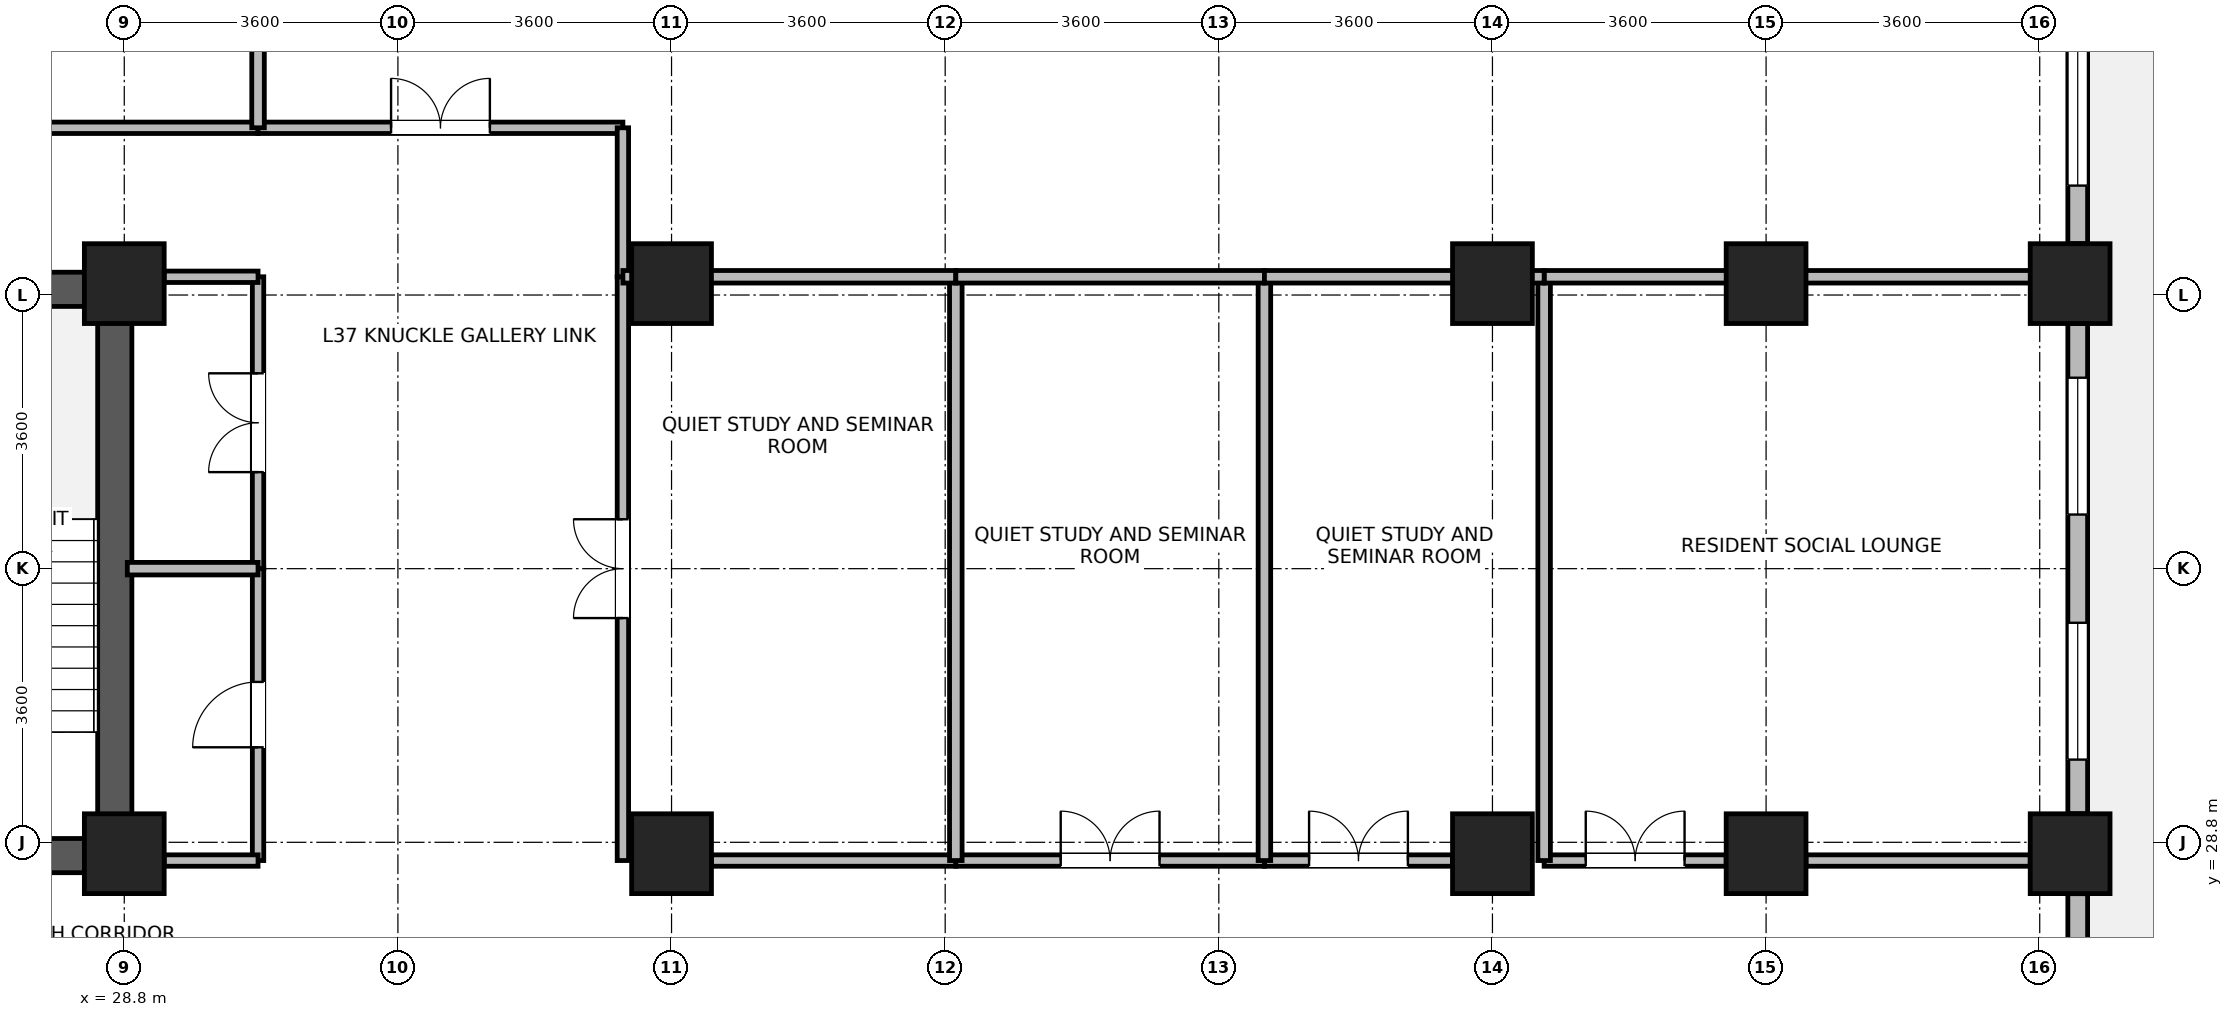
"""IFC4 building model, lengths in metres.
Left out: names, types, materials, properties, quantities, classifications, styles, units other than length and angle.
Written with IfcOpenShell. Run it as: python <this file> out.ifc"""

import sys

from ifc_helpers import new_model, si_unit, direction, frame, frame_2d, origin, origin_2d, place, context, subcontext, project, spatial, rectangle, extrude, source, transform, mapped, element, fill, save


model = new_model("IFC4")
c1 = context("Model", 3, precision=1e-05, world=origin(), true_north=direction((0.0, 1.0)))
c2 = subcontext(c1, "Body", "Model", "MODEL_VIEW")
j1 = project(units=[si_unit("LENGTHUNIT", "METRE"), si_unit("PLANEANGLEUNIT", "RADIAN")], contexts=[c1])
p1 = place(None, origin())
s1 = spatial("IfcSite", under=j1, at=p1, CompositionType="ELEMENT")
p2 = place(p1, origin())
s2 = spatial("IfcBuilding", under=s1, at=p2, CompositionType="ELEMENT")
p3 = place(p2, frame((0.0, 0.0, 147.6)))
s3 = spatial("IfcBuildingStorey", under=s2, at=p3, CompositionType="ELEMENT", Elevation=147.6)
p4 = place(p3, frame((28.675, 28.4, 0.0), z_axis=(0.0, 0.0, 1.0), x_axis=(0.0, 1.0, 0.0)))
e1 = element("IfcWall", 1, at=p4, inside=s3, PredefinedType="SHEAR", context=c2, shape_type="SweptSolid", body=[
    extrude(rectangle(XDim=7.9, YDim=0.45, at=frame_2d((3.95, 0.0))), origin(), (0.0, 0.0, 1.0), 3.46),
])
for number, where, z_axis, x_axis in (
    (2, (25.25, 28.625, 0.0), (0.0, 0.0, 1.0), (1.0, 0.0, 0.0)),
    (3, (25.25, 36.075, 0.0), (0.0, 0.0, 1.0), (1.0, 0.0, 0.0)),
):
    element("IfcWall", number, at=place(p3, frame(where, z_axis=z_axis, x_axis=x_axis)), inside=s3, PredefinedType="SHEAR", context=c2, shape_type="SweptSolid", body=[
        extrude(rectangle(XDim=3.2, YDim=0.45, at=frame_2d((1.6, 0.0))), origin(), (0.0, 0.0, 1.0), 3.46),
    ])
m1 = source(origin(), c2, "Body", "SweptSolid", [
    extrude(rectangle(XDim=1.05, YDim=1.05, at=origin_2d()), origin(), (0.0, 0.0, 1.0), 3.7),
])
for number, where, z_axis, x_axis in (
    (4, (28.8, 28.65, 0.0), (0.0, 0.0, 1.0), (1.0, 0.0, 0.0)),
    (5, (28.8, 36.15, 0.0), (0.0, 0.0, 1.0), (1.0, 0.0, 0.0)),
    (6, (36.0, 28.65, 0.0), (0.0, 0.0, 1.0), (1.0, 0.0, 0.0)),
    (7, (36.0, 36.15, 0.0), (0.0, 0.0, 1.0), (1.0, 0.0, 0.0)),
    (8, (46.8, 28.65, 0.0), (0.0, 0.0, 1.0), (1.0, 0.0, 0.0)),
    (9, (46.8, 36.15, 0.0), (0.0, 0.0, 1.0), (1.0, 0.0, 0.0)),
    (10, (50.4, 28.65, 0.0), (0.0, 0.0, 1.0), (1.0, 0.0, 0.0)),
    (11, (50.4, 36.15, 0.0), (0.0, 0.0, 1.0), (1.0, 0.0, 0.0)),
    (12, (54.4, 28.65, 0.0), (0.0, 0.0, 1.0), (1.0, 0.0, 0.0)),
    (13, (54.4, 36.15, 0.0), (0.0, 0.0, 1.0), (1.0, 0.0, 0.0)),
):
    element("IfcColumn", number, at=place(p3, frame(where, z_axis=z_axis, x_axis=x_axis)), inside=s3, PredefinedType="COLUMN", context=c2, shape_type="MappedRepresentation", body=[
        mapped(m1, transform((0.0, 0.0, 0.0), x_axis=(1.0, 0.0, 0.0), y_axis=(0.0, 1.0, 0.0), z_axis=(0.0, 0.0, 1.0), scale=1.0)),
    ])
p5 = place(p3, frame((54.5, 28.124, 0.0), z_axis=(0.0, 0.0, 1.0), x_axis=(0.0, -1.0, 0.0)))
e14 = element("IfcWall", 14, at=p5, inside=s3, PredefinedType="STANDARD", context=c2, shape_type="SweptSolid", body=[
    extrude(rectangle(XDim=5.998, YDim=0.26, at=frame_2d((2.999, 0.0))), origin(), (0.0, 0.0, 1.0), 2.99),
])
p6 = place(p5, frame((3.598, 0.0, 0.85)))
e15 = element("IfcOpeningElement", 15, at=p6, cuts=e14, PredefinedType="OPENING", context=c2, shape_type="SweptSolid", body=[
    extrude(rectangle(XDim=1.8, YDim=1.85, at=frame_2d((0.9, 0.925))), frame((0.0, 0.14, 0.0), z_axis=(0.0, -1.0, 0.0), x_axis=(1.0, 0.0, 0.0)), (0.0, 0.0, 1.0), 0.28),
])
p7 = place(p5, frame((2.044, 0.0, 0.85)))
e16 = element("IfcOpeningElement", 16, at=p7, cuts=e14, PredefinedType="OPENING", context=c2, shape_type="SweptSolid", body=[
    extrude(rectangle(XDim=0.95, YDim=1.75, at=frame_2d((0.475, 0.875))), frame((0.0, 0.14, 0.0), z_axis=(0.0, -1.0, 0.0), x_axis=(1.0, 0.0, 0.0)), (0.0, 0.0, 1.0), 0.28),
])
p8 = place(p3, frame((54.5, 35.624, 0.0), z_axis=(0.0, 0.0, 1.0), x_axis=(0.0, -1.0, 0.0)))
e17 = element("IfcWall", 17, at=p8, inside=s3, PredefinedType="STANDARD", context=c2, shape_type="SweptSolid", body=[
    extrude(rectangle(XDim=6.448, YDim=0.26, at=frame_2d((3.224, 0.0))), origin(), (0.0, 0.0, 1.0), 2.99),
])
p9 = place(p8, frame((0.712, 0.0, 0.85)))
e18 = element("IfcOpeningElement", 18, at=p9, cuts=e17, PredefinedType="OPENING", context=c2, shape_type="SweptSolid", body=[
    extrude(rectangle(XDim=1.8, YDim=1.85, at=frame_2d((0.9, 0.925))), frame((0.0, 0.14, 0.0), z_axis=(0.0, -1.0, 0.0), x_axis=(1.0, 0.0, 0.0)), (0.0, 0.0, 1.0), 0.28),
])
p10 = place(p8, frame((3.936, 0.0, 0.85)))
e19 = element("IfcOpeningElement", 19, at=p10, cuts=e17, PredefinedType="OPENING", context=c2, shape_type="SweptSolid", body=[
    extrude(rectangle(XDim=1.8, YDim=1.85, at=frame_2d((0.9, 0.925))), frame((0.0, 0.14, 0.0), z_axis=(0.0, -1.0, 0.0), x_axis=(1.0, 0.0, 0.0)), (0.0, 0.0, 1.0), 0.28),
])
p11 = place(p3, frame((54.5, 43.33, 0.0), z_axis=(0.0, 0.0, 1.0), x_axis=(0.0, -1.0, 0.0)))
e20 = element("IfcWall", 20, at=p11, inside=s3, PredefinedType="STANDARD", context=c2, shape_type="SweptSolid", body=[
    extrude(rectangle(XDim=6.654, YDim=0.26, at=frame_2d((3.327, 0.0))), origin(), (0.0, 0.0, 1.0), 3.44),
])
p12 = place(p11, frame((0.763, 0.0, 0.85)))
e21 = element("IfcOpeningElement", 21, at=p12, cuts=e20, PredefinedType="OPENING", context=c2, shape_type="SweptSolid", body=[
    extrude(rectangle(XDim=1.8, YDim=1.85, at=frame_2d((0.9, 0.925))), frame((0.0, 0.14, 0.0), z_axis=(0.0, -1.0, 0.0), x_axis=(1.0, 0.0, 0.0)), (0.0, 0.0, 1.0), 0.28),
])
p13 = place(p11, frame((4.091, 0.0, 0.85)))
e22 = element("IfcOpeningElement", 22, at=p13, cuts=e20, PredefinedType="OPENING", context=c2, shape_type="SweptSolid", body=[
    extrude(rectangle(XDim=1.8, YDim=1.85, at=frame_2d((0.9, 0.925))), frame((0.0, 0.14, 0.0), z_axis=(0.0, -1.0, 0.0), x_axis=(1.0, 0.0, 0.0)), (0.0, 0.0, 1.0), 0.28),
])
p14 = place(p3, frame((35.36, 28.56, 0.0), z_axis=(0.0, 0.0, 1.0), x_axis=(0.0, 1.0, 0.0)))
e23 = element("IfcWall", 23, at=p14, inside=s3, PredefinedType="PARTITIONING", context=c2, shape_type="SweptSolid", body=[
    extrude(rectangle(XDim=7.68, YDim=0.15, at=frame_2d((3.84, 0.0))), origin(), (0.0, 0.0, 1.0), 3.44),
])
p15 = place(p14, frame((3.19, 0.0, 0.0)))
e24 = element("IfcOpeningElement", 24, at=p15, cuts=e23, PredefinedType="OPENING", context=c2, shape_type="SweptSolid", body=[
    extrude(rectangle(XDim=1.3, YDim=2.12, at=frame_2d((0.65, 1.06))), frame((0.0, 0.085, 0.0), z_axis=(0.0, -1.0, 0.0), x_axis=(1.0, 0.0, 0.0)), (0.0, 0.0, 1.0), 0.17),
])
p16 = place(p3, frame((23.48, 38.2, 0.0), z_axis=(0.0, 0.0, 1.0), x_axis=(1.0, 0.0, 0.0)))
e25 = element("IfcWall", 25, at=p16, inside=s3, PredefinedType="PARTITIONING", context=c2, shape_type="SweptSolid", body=[
    extrude(rectangle(XDim=7.08, YDim=0.15, at=frame_2d((3.54, 0.0))), origin(), (0.0, 0.0, 1.0), 3.44),
])
p17 = place(p16, frame((2.89, 0.0, 0.0)))
e26 = element("IfcOpeningElement", 26, at=p17, cuts=e25, PredefinedType="OPENING", context=c2, shape_type="SweptSolid", body=[
    extrude(rectangle(XDim=1.3, YDim=2.12, at=frame_2d((0.65, 1.06))), frame((0.0, 0.085, 0.0), z_axis=(0.0, -1.0, 0.0), x_axis=(1.0, 0.0, 0.0)), (0.0, 0.0, 1.0), 0.17),
])
p18 = place(p3, frame((47.48, 28.56, 0.0), z_axis=(0.0, 0.0, 1.0), x_axis=(1.0, 0.0, 0.0)))
e27 = element("IfcWall", 27, at=p18, inside=s3, PredefinedType="PARTITIONING", context=c2, shape_type="SweptSolid", body=[
    extrude(rectangle(XDim=2.395, YDim=0.15, at=frame_2d((1.198, 0.0))), origin(), (0.0, 0.0, 1.0), 2.84),
])
p19 = place(p18, frame((0.548, 0.0, 0.0)))
e28 = element("IfcOpeningElement", 28, at=p19, cuts=e27, PredefinedType="OPENING", context=c2, shape_type="SweptSolid", body=[
    extrude(rectangle(XDim=1.3, YDim=2.12, at=frame_2d((0.65, 1.06))), frame((0.0, 0.085, 0.0), z_axis=(0.0, -1.0, 0.0), x_axis=(1.0, 0.0, 0.0)), (0.0, 0.0, 1.0), 0.17),
])
p20 = place(p3, frame((50.925, 28.56, 0.0), z_axis=(0.0, 0.0, 1.0), x_axis=(1.0, 0.0, 0.0)))
e29 = element("IfcWall", 29, at=p20, inside=s3, PredefinedType="PARTITIONING", context=c2, shape_type="SweptSolid", body=[
    extrude(rectangle(XDim=2.95, YDim=0.15, at=frame_2d((1.475, 0.0))), origin(), (0.0, 0.0, 1.0), 2.84),
])
p21 = place(p3, frame((30.56, 38.2, 0.0), z_axis=(0.0, 0.0, 1.0), x_axis=(1.0, 0.0, 0.0)))
e30 = element("IfcWall", 30, at=p21, inside=s3, PredefinedType="PARTITIONING", context=c2, shape_type="SweptSolid", body=[
    extrude(rectangle(XDim=4.8, YDim=0.15, at=frame_2d((2.4, 0.0))), origin(), (0.0, 0.0, 1.0), 3.44),
])
p22 = place(p21, frame((1.75, 0.0, 0.0)))
e31 = element("IfcOpeningElement", 31, at=p22, cuts=e30, PredefinedType="OPENING", context=c2, shape_type="SweptSolid", body=[
    extrude(rectangle(XDim=1.3, YDim=2.12, at=frame_2d((0.65, 1.06))), frame((0.0, 0.085, 0.0), z_axis=(0.0, -1.0, 0.0), x_axis=(1.0, 0.0, 0.0)), (0.0, 0.0, 1.0), 0.17),
])
p23 = place(p3, frame((36.525, 28.56, 0.0), z_axis=(0.0, 0.0, 1.0), x_axis=(1.0, 0.0, 0.0)))
e32 = element("IfcWall", 32, at=p23, inside=s3, PredefinedType="PARTITIONING", context=c2, shape_type="SweptSolid", body=[
    extrude(rectangle(XDim=3.215, YDim=0.15, at=frame_2d((1.607, 0.0))), origin(), (0.0, 0.0, 1.0), 2.84),
])
p24 = place(p3, frame((39.74, 28.56, 0.0), z_axis=(0.0, 0.0, 1.0), x_axis=(1.0, 0.0, 0.0)))
e33 = element("IfcWall", 33, at=p24, inside=s3, PredefinedType="PARTITIONING", context=c2, shape_type="SweptSolid", body=[
    extrude(rectangle(XDim=4.06, YDim=0.15, at=frame_2d((2.03, 0.0))), origin(), (0.0, 0.0, 1.0), 2.84),
])
p25 = place(p24, frame((1.38, 0.0, 0.0)))
e34 = element("IfcOpeningElement", 34, at=p25, cuts=e33, PredefinedType="OPENING", context=c2, shape_type="SweptSolid", body=[
    extrude(rectangle(XDim=1.3, YDim=2.12, at=frame_2d((0.65, 1.06))), frame((0.0, 0.085, 0.0), z_axis=(0.0, -1.0, 0.0), x_axis=(1.0, 0.0, 0.0)), (0.0, 0.0, 1.0), 0.17),
])
p26 = place(p3, frame((30.56, 32.4, 0.0), z_axis=(0.0, 0.0, 1.0), x_axis=(0.0, 1.0, 0.0)))
e35 = element("IfcWall", 35, at=p26, inside=s3, PredefinedType="PARTITIONING", context=c2, shape_type="SweptSolid", body=[
    extrude(rectangle(XDim=3.84, YDim=0.15, at=frame_2d((1.92, 0.0))), origin(), (0.0, 0.0, 1.0), 3.44),
])
p27 = place(p26, frame((1.27, 0.0, 0.0)))
e36 = element("IfcOpeningElement", 36, at=p27, cuts=e35, PredefinedType="OPENING", context=c2, shape_type="SweptSolid", body=[
    extrude(rectangle(XDim=1.3, YDim=2.12, at=frame_2d((0.65, 1.06))), frame((0.0, 0.085, 0.0), z_axis=(0.0, -1.0, 0.0), x_axis=(1.0, 0.0, 0.0)), (0.0, 0.0, 1.0), 0.17),
])
p28 = place(p3, frame((30.56, 28.56, 0.0), z_axis=(0.0, 0.0, 1.0), x_axis=(0.0, 1.0, 0.0)))
e37 = element("IfcWall", 37, at=p28, inside=s3, PredefinedType="PARTITIONING", context=c2, shape_type="SweptSolid", body=[
    extrude(rectangle(XDim=3.84, YDim=0.15, at=frame_2d((1.92, 0.0))), origin(), (0.0, 0.0, 1.0), 3.44),
])
p29 = place(p28, frame((1.49, 0.0, 0.0)))
e38 = element("IfcOpeningElement", 38, at=p29, cuts=e37, PredefinedType="OPENING", context=c2, shape_type="SweptSolid", body=[
    extrude(rectangle(XDim=0.86, YDim=2.02, at=frame_2d((0.43, 1.01))), frame((0.0, 0.085, 0.0), z_axis=(0.0, -1.0, 0.0), x_axis=(1.0, 0.0, 0.0)), (0.0, 0.0, 1.0), 0.17),
])
p30 = place(p3, frame((43.8, 28.56, 0.0), z_axis=(0.0, 0.0, 1.0), x_axis=(1.0, 0.0, 0.0)))
e39 = element("IfcWall", 39, at=p30, inside=s3, PredefinedType="PARTITIONING", context=c2, shape_type="SweptSolid", body=[
    extrude(rectangle(XDim=2.475, YDim=0.15, at=frame_2d((1.237, 0.0))), origin(), (0.0, 0.0, 1.0), 2.84),
])
p31 = place(p30, frame((0.587, 0.0, 0.0)))
e40 = element("IfcOpeningElement", 40, at=p31, cuts=e39, PredefinedType="OPENING", context=c2, shape_type="SweptSolid", body=[
    extrude(rectangle(XDim=1.3, YDim=2.12, at=frame_2d((0.65, 1.06))), frame((0.0, 0.085, 0.0), z_axis=(0.0, -1.0, 0.0), x_axis=(1.0, 0.0, 0.0)), (0.0, 0.0, 1.0), 0.17),
])
p32 = place(p3, frame((35.36, 36.24, 0.0), z_axis=(0.0, 0.0, 1.0), x_axis=(0.0, 1.0, 0.0)))
e41 = element("IfcWall", 41, at=p32, inside=s3, PredefinedType="PARTITIONING", context=c2, shape_type="SweptSolid", body=[
    extrude(rectangle(XDim=1.96, YDim=0.15, at=frame_2d((0.98, 0.0))), origin(), (0.0, 0.0, 1.0), 3.44),
])
for number, where, z_axis, x_axis in (
    (42, (29.325, 28.56, 0.0), (0.0, 0.0, 1.0), (1.0, 0.0, 0.0)),
    (43, (29.325, 36.24, 0.0), (0.0, 0.0, 1.0), (1.0, 0.0, 0.0)),
):
    element("IfcWall", number, at=place(p3, frame(where, z_axis=z_axis, x_axis=x_axis)), inside=s3, PredefinedType="PARTITIONING", context=c2, shape_type="SweptSolid", body=[
        extrude(rectangle(XDim=1.235, YDim=0.15, at=frame_2d((0.618, 0.0))), origin(), (0.0, 0.0, 1.0), 2.84),
    ])
for number, where, z_axis, x_axis in (
    (44, (39.74, 28.56, 0.0), (0.0, 0.0, 1.0), (0.0, 1.0, 0.0)),
    (45, (43.8, 28.56, 0.0), (0.0, 0.0, 1.0), (0.0, 1.0, 0.0)),
    (46, (47.48, 28.56, 0.0), (0.0, 0.0, 1.0), (0.0, 1.0, 0.0)),
):
    element("IfcWall", number, at=place(p3, frame(where, z_axis=z_axis, x_axis=x_axis)), inside=s3, PredefinedType="PARTITIONING", context=c2, shape_type="SweptSolid", body=[
        extrude(rectangle(XDim=7.68, YDim=0.165, at=frame_2d((3.84, 0.0))), origin(), (0.0, 0.0, 1.0), 3.44),
    ])
p33 = place(p3, frame((47.48, 36.24, 0.0), z_axis=(0.0, 0.0, 1.0), x_axis=(1.0, 0.0, 0.0)))
e47 = element("IfcWall", 47, at=p33, inside=s3, PredefinedType="PARTITIONING", context=c2, shape_type="SweptSolid", body=[
    extrude(rectangle(XDim=6.888, YDim=0.165, at=frame_2d((3.444, 0.0))), origin(), (0.0, 0.0, 1.0), 2.84),
])
p34 = place(p3, frame((30.56, 38.2, 0.0), z_axis=(0.0, 0.0, 1.0), x_axis=(0.0, 1.0, 0.0)))
e48 = element("IfcWall", 48, at=p34, inside=s3, PredefinedType="PARTITIONING", context=c2, shape_type="SweptSolid", body=[
    extrude(rectangle(XDim=4.868, YDim=0.165, at=frame_2d((2.434, 0.0))), origin(), (0.0, 0.0, 1.0), 3.44),
])
p35 = place(p3, frame((35.36, 36.24, 0.0), z_axis=(0.0, 0.0, 1.0), x_axis=(1.0, 0.0, 0.0)))
e49 = element("IfcWall", 49, at=p35, inside=s3, PredefinedType="PARTITIONING", context=c2, shape_type="SweptSolid", body=[
    extrude(rectangle(XDim=4.38, YDim=0.165, at=frame_2d((2.19, 0.0))), origin(), (0.0, 0.0, 1.0), 2.84),
])
p36 = place(p3, frame((39.74, 36.24, 0.0), z_axis=(0.0, 0.0, 1.0), x_axis=(1.0, 0.0, 0.0)))
e50 = element("IfcWall", 50, at=p36, inside=s3, PredefinedType="PARTITIONING", context=c2, shape_type="SweptSolid", body=[
    extrude(rectangle(XDim=4.06, YDim=0.165, at=frame_2d((2.03, 0.0))), origin(), (0.0, 0.0, 1.0), 2.84),
])
p37 = place(p3, frame((43.8, 36.24, 0.0), z_axis=(0.0, 0.0, 1.0), x_axis=(1.0, 0.0, 0.0)))
e51 = element("IfcWall", 51, at=p37, inside=s3, PredefinedType="PARTITIONING", context=c2, shape_type="SweptSolid", body=[
    extrude(rectangle(XDim=3.68, YDim=0.165, at=frame_2d((1.84, 0.0))), origin(), (0.0, 0.0, 1.0), 2.84),
])
p38 = place(p3, frame((28.84, 32.4, 0.0), z_axis=(0.0, 0.0, 1.0), x_axis=(1.0, 0.0, 0.0)))
e52 = element("IfcWall", 52, at=p38, inside=s3, PredefinedType="PARTITIONING", context=c2, shape_type="SweptSolid", body=[
    extrude(rectangle(XDim=1.72, YDim=0.165, at=frame_2d((0.86, 0.0))), origin(), (0.0, 0.0, 1.0), 3.44),
])
p39 = place(p9, origin())
e53 = element("IfcWindow", 53, at=p39, inside=s3, PartitioningType="SINGLE_PANEL", PredefinedType="WINDOW", context=c2, shape_type="SweptSolid", body=[
    extrude(rectangle(XDim=1.8, YDim=1.85, at=frame_2d((0.9, 0.925))), frame((0.0, 0.03, 0.0), z_axis=(0.0, -1.0, 0.0), x_axis=(1.0, 0.0, 0.0)), (0.0, 0.0, 1.0), 0.06),
])
fill(e18, e53)
p40 = place(p10, origin())
e54 = element("IfcWindow", 54, at=p40, inside=s3, PartitioningType="SINGLE_PANEL", PredefinedType="WINDOW", context=c2, shape_type="SweptSolid", body=[
    extrude(rectangle(XDim=1.8, YDim=1.85, at=frame_2d((0.9, 0.925))), frame((0.0, 0.03, 0.0), z_axis=(0.0, -1.0, 0.0), x_axis=(1.0, 0.0, 0.0)), (0.0, 0.0, 1.0), 0.06),
])
fill(e19, e54)
p41 = place(p13, origin())
e55 = element("IfcWindow", 55, at=p41, inside=s3, PartitioningType="SINGLE_PANEL", PredefinedType="WINDOW", context=c2, shape_type="SweptSolid", body=[
    extrude(rectangle(XDim=1.8, YDim=1.85, at=frame_2d((0.9, 0.925))), frame((0.0, 0.03, 0.0), z_axis=(0.0, -1.0, 0.0), x_axis=(1.0, 0.0, 0.0)), (0.0, 0.0, 1.0), 0.06),
])
fill(e22, e55)
p42 = place(p15, origin())
e56 = element("IfcDoor", 56, at=p42, inside=s3, OperationType="DOUBLE_DOOR_SINGLE_SWING", PredefinedType="DOOR", context=c2, shape_type="SweptSolid", body=[
    extrude(rectangle(XDim=1.3, YDim=2.12, at=frame_2d((0.65, 1.06))), frame((0.0, 0.025, 0.0), z_axis=(0.0, -1.0, 0.0), x_axis=(1.0, 0.0, 0.0)), (0.0, 0.0, 1.0), 0.05),
])
fill(e24, e56)
p43 = place(p19, origin())
e57 = element("IfcDoor", 57, at=p43, inside=s3, OperationType="DOUBLE_DOOR_SINGLE_SWING", PredefinedType="DOOR", context=c2, shape_type="SweptSolid", body=[
    extrude(rectangle(XDim=1.3, YDim=2.12, at=frame_2d((0.65, 1.06))), frame((0.0, 0.025, 0.0), z_axis=(0.0, -1.0, 0.0), x_axis=(1.0, 0.0, 0.0)), (0.0, 0.0, 1.0), 0.05),
])
fill(e28, e57)
p44 = place(p22, origin())
e58 = element("IfcDoor", 58, at=p44, inside=s3, OperationType="DOUBLE_DOOR_SINGLE_SWING", PredefinedType="DOOR", context=c2, shape_type="SweptSolid", body=[
    extrude(rectangle(XDim=1.3, YDim=2.12, at=frame_2d((0.65, 1.06))), frame((0.0, 0.025, 0.0), z_axis=(0.0, -1.0, 0.0), x_axis=(1.0, 0.0, 0.0)), (0.0, 0.0, 1.0), 0.05),
])
fill(e31, e58)
p45 = place(p25, origin())
e59 = element("IfcDoor", 59, at=p45, inside=s3, OperationType="DOUBLE_DOOR_SINGLE_SWING", PredefinedType="DOOR", context=c2, shape_type="SweptSolid", body=[
    extrude(rectangle(XDim=1.3, YDim=2.12, at=frame_2d((0.65, 1.06))), frame((0.0, 0.025, 0.0), z_axis=(0.0, -1.0, 0.0), x_axis=(1.0, 0.0, 0.0)), (0.0, 0.0, 1.0), 0.05),
])
fill(e34, e59)
p46 = place(p27, origin())
e60 = element("IfcDoor", 60, at=p46, inside=s3, OperationType="DOUBLE_DOOR_SINGLE_SWING", PredefinedType="DOOR", context=c2, shape_type="SweptSolid", body=[
    extrude(rectangle(XDim=1.3, YDim=2.12, at=frame_2d((0.65, 1.06))), frame((0.0, 0.025, 0.0), z_axis=(0.0, -1.0, 0.0), x_axis=(1.0, 0.0, 0.0)), (0.0, 0.0, 1.0), 0.05),
])
fill(e36, e60)
p47 = place(p29, origin())
e61 = element("IfcDoor", 61, at=p47, inside=s3, OperationType="SINGLE_SWING_LEFT", PredefinedType="DOOR", context=c2, shape_type="SweptSolid", body=[
    extrude(rectangle(XDim=0.86, YDim=2.02, at=frame_2d((0.43, 1.01))), frame((0.0, 0.025, 0.0), z_axis=(0.0, -1.0, 0.0), x_axis=(1.0, 0.0, 0.0)), (0.0, 0.0, 1.0), 0.05),
])
fill(e38, e61)
p48 = place(p31, origin())
e62 = element("IfcDoor", 62, at=p48, inside=s3, OperationType="DOUBLE_DOOR_SINGLE_SWING", PredefinedType="DOOR", context=c2, shape_type="SweptSolid", body=[
    extrude(rectangle(XDim=1.3, YDim=2.12, at=frame_2d((0.65, 1.06))), frame((0.0, 0.025, 0.0), z_axis=(0.0, -1.0, 0.0), x_axis=(1.0, 0.0, 0.0)), (0.0, 0.0, 1.0), 0.05),
])
fill(e40, e62)
save(model, sys.argv[1])
